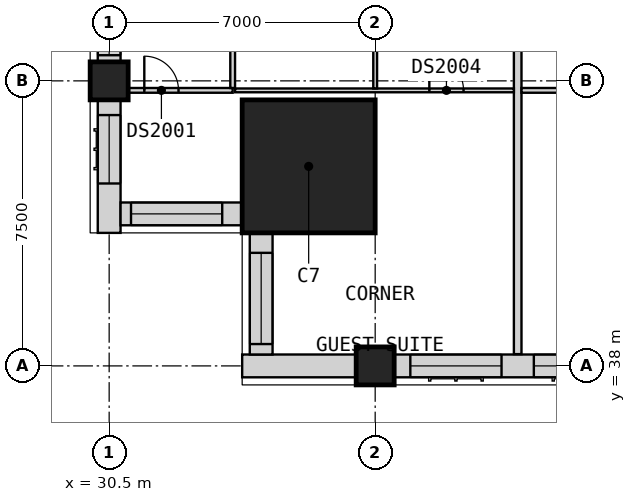
"""IFC4 building model, lengths in metres.
Left out: names, types, materials, properties, quantities, classifications, styles, units other than length and angle.
Written with IfcOpenShell. Run it as: python <this file> out.ifc"""

import sys

from ifc_helpers import new_model, si_unit, direction, frame, frame_2d, origin, origin_2d, place, context, subcontext, project, spatial, rectangle, extrude, element, fill, save


model = new_model("IFC4")
c1 = context("Model", 3, precision=1e-05, world=origin(), true_north=direction((0.0, 1.0)))
c2 = subcontext(c1, "Body", "Model", "MODEL_VIEW")
j1 = project(units=[si_unit("LENGTHUNIT", "METRE"), si_unit("PLANEANGLEUNIT", "RADIAN")], contexts=[c1])
p1 = place(None, origin())
s1 = spatial("IfcSite", under=j1, at=p1, CompositionType="ELEMENT")
p2 = place(p1, origin())
s2 = spatial("IfcBuilding", under=s1, at=p2, CompositionType="ELEMENT")
p3 = place(p2, frame((0.0, 0.0, 133.8)))
s3 = spatial("IfcBuildingStorey", under=s2, at=p3, CompositionType="ELEMENT", Elevation=133.8)
for number, where, z_axis, x_axis in (
    (1, (30.5, 45.5, 0.0), (0.0, 0.0, 1.0), (1.0, 0.0, 0.0)),
    (2, (37.5, 38.0, 0.0), (0.0, 0.0, 1.0), (1.0, 0.0, 0.0)),
):
    element("IfcColumn", number, at=place(p3, frame(where, z_axis=z_axis, x_axis=x_axis)), inside=s3, PredefinedType="COLUMN", context=c2, shape_type="SweptSolid", body=[
        extrude(rectangle(XDim=1.0, YDim=1.0, at=origin_2d()), origin(), (0.0, 0.0, 1.0), 3.6),
    ])
p4 = place(p3, frame((35.75, 43.25, 0.0), z_axis=(0.0, 0.0, 1.0), x_axis=(1.0, 0.0, 0.0)))
e3 = element("IfcColumn", 3, at=p4, inside=s3, PredefinedType="COLUMN", context=c2, shape_type="SweptSolid", body=[
    extrude(rectangle(XDim=3.5, YDim=3.5, at=origin_2d()), origin(), (0.0, 0.0, 1.0), 3.6),
])
p5 = place(p3, frame((34.0, 38.0, 0.0), z_axis=(0.0, 0.0, 1.0), x_axis=(1.0, 0.0, 0.0)))
e4 = element("IfcWall", 4, at=p5, inside=s3, PredefinedType="SOLIDWALL", context=c2, shape_type="SweptSolid", body=[
    extrude(rectangle(XDim=3.0, YDim=0.6, at=frame_2d((1.5, 0.0))), origin(), (0.0, 0.0, 1.0), 3.35),
])
p6 = place(p3, frame((38.0, 38.0, 0.0), z_axis=(0.0, 0.0, 1.0), x_axis=(1.0, 0.0, 0.0)))
e5 = element("IfcWall", 5, at=p6, inside=s3, PredefinedType="SOLIDWALL", context=c2, shape_type="SweptSolid", body=[
    extrude(rectangle(XDim=6.5, YDim=0.6, at=frame_2d((3.25, 0.0))), origin(), (0.0, 0.0, 1.0), 2.85),
])
p7 = place(p6, frame((0.425, 0.0, 0.8)))
e6 = element("IfcOpeningElement", 6, at=p7, cuts=e5, PredefinedType="OPENING", context=c2, shape_type="SweptSolid", body=[
    extrude(rectangle(XDim=2.4, YDim=1.8, at=frame_2d((1.2, 0.9))), frame((0.0, 0.31, 0.0), z_axis=(0.0, -1.0, 0.0), x_axis=(1.0, 0.0, 0.0)), (0.0, 0.0, 1.0), 0.62),
])
p8 = place(p6, frame((3.675, 0.0, 0.8)))
e7 = element("IfcOpeningElement", 7, at=p8, cuts=e5, PredefinedType="OPENING", context=c2, shape_type="SweptSolid", body=[
    extrude(rectangle(XDim=2.4, YDim=1.8, at=frame_2d((1.2, 0.9))), frame((0.0, 0.31, 0.0), z_axis=(0.0, -1.0, 0.0), x_axis=(1.0, 0.0, 0.0)), (0.0, 0.0, 1.0), 0.62),
])
p9 = place(p3, frame((30.5, 52.0, 0.0), z_axis=(0.0, 0.0, 1.0), x_axis=(0.0, -1.0, 0.0)))
e8 = element("IfcWall", 8, at=p9, inside=s3, PredefinedType="SOLIDWALL", context=c2, shape_type="SweptSolid", body=[
    extrude(rectangle(XDim=6.0, YDim=0.6, at=frame_2d((3.0, 0.0))), origin(), (0.0, 0.0, 1.0), 2.85),
])
p10 = place(p9, frame((3.425, 0.0, 0.8)))
e9 = element("IfcOpeningElement", 9, at=p10, cuts=e8, PredefinedType="OPENING", context=c2, shape_type="SweptSolid", body=[
    extrude(rectangle(XDim=2.4, YDim=1.8, at=frame_2d((1.2, 0.9))), frame((0.0, 0.31, 0.0), z_axis=(0.0, -1.0, 0.0), x_axis=(1.0, 0.0, 0.0)), (0.0, 0.0, 1.0), 0.62),
])
p11 = place(p9, frame((0.425, 0.0, 0.8)))
e10 = element("IfcOpeningElement", 10, at=p11, cuts=e8, PredefinedType="OPENING", context=c2, shape_type="SweptSolid", body=[
    extrude(rectangle(XDim=2.4, YDim=1.8, at=frame_2d((1.2, 0.9))), frame((0.0, 0.31, 0.0), z_axis=(0.0, -1.0, 0.0), x_axis=(1.0, 0.0, 0.0)), (0.0, 0.0, 1.0), 0.62),
])
p12 = place(p3, frame((30.5, 45.0, 0.0), z_axis=(0.0, 0.0, 1.0), x_axis=(0.0, -1.0, 0.0)))
e11 = element("IfcWall", 11, at=p12, inside=s3, PredefinedType="SOLIDWALL", context=c2, shape_type="SweptSolid", body=[
    extrude(rectangle(XDim=3.5, YDim=0.6, at=frame_2d((1.75, 0.0))), origin(), (0.0, 0.0, 1.0), 3.35),
])
p13 = place(p12, frame((0.4, 0.0, 0.8)))
e12 = element("IfcOpeningElement", 12, at=p13, cuts=e11, PredefinedType="OPENING", context=c2, shape_type="SweptSolid", body=[
    extrude(rectangle(XDim=1.8, YDim=1.8, at=frame_2d((0.9, 0.9))), frame((0.0, 0.31, 0.0), z_axis=(0.0, -1.0, 0.0), x_axis=(1.0, 0.0, 0.0)), (0.0, 0.0, 1.0), 0.62),
])
p14 = place(p3, frame((30.8, 42.0, 0.0), z_axis=(0.0, 0.0, 1.0), x_axis=(1.0, 0.0, 0.0)))
e13 = element("IfcWall", 13, at=p14, inside=s3, PredefinedType="SOLIDWALL", context=c2, shape_type="SweptSolid", body=[
    extrude(rectangle(XDim=3.2, YDim=0.6, at=frame_2d((1.6, 0.0))), origin(), (0.0, 0.0, 1.0), 3.35),
])
p15 = place(p14, frame((0.275, 0.0, 0.8)))
e14 = element("IfcOpeningElement", 14, at=p15, cuts=e13, PredefinedType="OPENING", context=c2, shape_type="SweptSolid", body=[
    extrude(rectangle(XDim=2.4, YDim=1.8, at=frame_2d((1.2, 0.9))), frame((0.0, 0.31, 0.0), z_axis=(0.0, -1.0, 0.0), x_axis=(1.0, 0.0, 0.0)), (0.0, 0.0, 1.0), 0.62),
])
p16 = place(p3, frame((34.5, 41.5, 0.0), z_axis=(0.0, 0.0, 1.0), x_axis=(0.0, -1.0, 0.0)))
e15 = element("IfcWall", 15, at=p16, inside=s3, PredefinedType="SOLIDWALL", context=c2, shape_type="SweptSolid", body=[
    extrude(rectangle(XDim=3.2, YDim=0.6, at=frame_2d((1.6, 0.0))), origin(), (0.0, 0.0, 1.0), 3.35),
])
p17 = place(p16, frame((0.525, 0.0, 0.8)))
e16 = element("IfcOpeningElement", 16, at=p17, cuts=e15, PredefinedType="OPENING", context=c2, shape_type="SweptSolid", body=[
    extrude(rectangle(XDim=2.4, YDim=1.8, at=frame_2d((1.2, 0.9))), frame((0.0, 0.31, 0.0), z_axis=(0.0, -1.0, 0.0), x_axis=(1.0, 0.0, 0.0)), (0.0, 0.0, 1.0), 0.62),
])
p18 = place(p3, frame((41.25, 38.31, 0.0), z_axis=(0.0, 0.0, 1.0), x_axis=(0.0, 1.0, 0.0)))
e17 = element("IfcWall", 17, at=p18, inside=s3, PredefinedType="PARTITIONING", context=c2, shape_type="SweptSolid", body=[
    extrude(rectangle(XDim=11.715, YDim=0.2, at=frame_2d((5.857, 0.0))), origin(), (0.0, 0.0, 1.0), 3.35),
])
p19 = place(p3, frame((33.812, 45.25, 0.0), z_axis=(0.0, 0.0, 1.0), x_axis=(1.0, 0.0, 0.0)))
e18 = element("IfcWall", 18, at=p19, inside=s3, PredefinedType="PARTITIONING", context=c2, shape_type="SweptSolid", body=[
    extrude(rectangle(XDim=7.337, YDim=0.1, at=frame_2d((3.669, 0.0))), origin(), (0.0, 0.0, 1.0), 3.35),
])
p20 = place(p19, frame((5.113, 0.0, 0.0)))
e19 = element("IfcOpeningElement", 19, at=p20, cuts=e18, PredefinedType="OPENING", context=c2, shape_type="SweptSolid", body=[
    extrude(rectangle(XDim=0.9, YDim=2.1, at=frame_2d((0.45, 1.05))), frame((0.0, 0.06, 0.0), z_axis=(0.0, -1.0, 0.0), x_axis=(1.0, 0.0, 0.0)), (0.0, 0.0, 1.0), 0.12),
])
p21 = place(p3, frame((37.5, 45.3, 0.0), z_axis=(0.0, 0.0, 1.0), x_axis=(0.0, 1.0, 0.0)))
e20 = element("IfcWall", 20, at=p21, inside=s3, PredefinedType="PARTITIONING", context=c2, shape_type="SweptSolid", body=[
    extrude(rectangle(XDim=4.725, YDim=0.1, at=frame_2d((2.362, 0.0))), origin(), (0.0, 0.0, 1.0), 3.35),
])
p22 = place(p21, frame((1.925, 0.0, 0.0)))
e21 = element("IfcOpeningElement", 21, at=p22, cuts=e20, PredefinedType="OPENING", context=c2, shape_type="SweptSolid", body=[
    extrude(rectangle(XDim=0.9, YDim=2.1, at=frame_2d((0.45, 1.05))), frame((0.0, 0.06, 0.0), z_axis=(0.0, -1.0, 0.0), x_axis=(1.0, 0.0, 0.0)), (0.0, 0.0, 1.0), 0.12),
])
p23 = place(p3, frame((30.0, 45.25, 0.0), z_axis=(0.0, 0.0, 1.0), x_axis=(1.0, 0.0, 0.0)))
e22 = element("IfcWall", 22, at=p23, inside=s3, PredefinedType="PARTITIONING", context=c2, shape_type="SweptSolid", body=[
    extrude(rectangle(XDim=3.75, YDim=0.125, at=frame_2d((1.875, 0.0))), origin(), (0.0, 0.0, 1.0), 3.35),
])
p24 = place(p23, frame((1.425, 0.0, 0.0)))
e23 = element("IfcOpeningElement", 23, at=p24, cuts=e22, PredefinedType="OPENING", context=c2, shape_type="SweptSolid", body=[
    extrude(rectangle(XDim=0.9, YDim=2.1, at=frame_2d((0.45, 1.05))), frame((0.0, 0.073, 0.0), z_axis=(0.0, -1.0, 0.0), x_axis=(1.0, 0.0, 0.0)), (0.0, 0.0, 1.0), 0.145),
])
p25 = place(p3, frame((41.35, 45.25, 0.0), z_axis=(0.0, 0.0, 1.0), x_axis=(1.0, 0.0, 0.0)))
e24 = element("IfcWall", 24, at=p25, inside=s3, PredefinedType="PARTITIONING", context=c2, shape_type="SweptSolid", body=[
    extrude(rectangle(XDim=4.4, YDim=0.125, at=frame_2d((2.2, 0.0))), origin(), (0.0, 0.0, 1.0), 3.35),
])
p26 = place(p25, frame((1.7, 0.0, 0.0)))
e25 = element("IfcOpeningElement", 25, at=p26, cuts=e24, PredefinedType="OPENING", context=c2, shape_type="SweptSolid", body=[
    extrude(rectangle(XDim=0.9, YDim=2.1, at=frame_2d((0.45, 1.05))), frame((0.0, 0.073, 0.0), z_axis=(0.0, -1.0, 0.0), x_axis=(1.0, 0.0, 0.0)), (0.0, 0.0, 1.0), 0.145),
])
p27 = place(p3, frame((33.75, 45.312, 0.0), z_axis=(0.0, 0.0, 1.0), x_axis=(0.0, 1.0, 0.0)))
e26 = element("IfcWall", 26, at=p27, inside=s3, PredefinedType="PARTITIONING", context=c2, shape_type="SweptSolid", body=[
    extrude(rectangle(XDim=4.712, YDim=0.125, at=frame_2d((2.356, 0.0))), origin(), (0.0, 0.0, 1.0), 3.35),
])
p28 = place(p7, origin())
e27 = element("IfcWindow", 27, at=p28, inside=s3, PartitioningType="SINGLE_PANEL", PredefinedType="WINDOW", context=c2, shape_type="SweptSolid", body=[
    extrude(rectangle(XDim=2.4, YDim=1.8, at=frame_2d((1.2, 0.9))), frame((0.0, -0.07, 0.0), z_axis=(0.0, -1.0, 0.0), x_axis=(1.0, 0.0, 0.0)), (0.0, 0.0, 1.0), 0.06),
])
fill(e6, e27)
p29 = place(p8, origin())
e28 = element("IfcWindow", 28, at=p29, inside=s3, PartitioningType="SINGLE_PANEL", PredefinedType="WINDOW", context=c2, shape_type="SweptSolid", body=[
    extrude(rectangle(XDim=2.4, YDim=1.8, at=frame_2d((1.2, 0.9))), frame((0.0, -0.07, 0.0), z_axis=(0.0, -1.0, 0.0), x_axis=(1.0, 0.0, 0.0)), (0.0, 0.0, 1.0), 0.06),
])
fill(e7, e28)
p30 = place(p10, origin())
e29 = element("IfcWindow", 29, at=p30, inside=s3, PartitioningType="SINGLE_PANEL", PredefinedType="WINDOW", context=c2, shape_type="SweptSolid", body=[
    extrude(rectangle(XDim=2.4, YDim=1.8, at=frame_2d((1.2, 0.9))), frame((0.0, -0.07, 0.0), z_axis=(0.0, -1.0, 0.0), x_axis=(1.0, 0.0, 0.0)), (0.0, 0.0, 1.0), 0.06),
])
fill(e9, e29)
p31 = place(p13, origin())
e30 = element("IfcWindow", 30, at=p31, inside=s3, PartitioningType="SINGLE_PANEL", PredefinedType="WINDOW", context=c2, shape_type="SweptSolid", body=[
    extrude(rectangle(XDim=1.8, YDim=1.8, at=frame_2d((0.9, 0.9))), frame((0.0, -0.07, 0.0), z_axis=(0.0, -1.0, 0.0), x_axis=(1.0, 0.0, 0.0)), (0.0, 0.0, 1.0), 0.06),
])
fill(e12, e30)
p32 = place(p15, origin())
e31 = element("IfcWindow", 31, at=p32, inside=s3, PartitioningType="SINGLE_PANEL", PredefinedType="WINDOW", context=c2, shape_type="SweptSolid", body=[
    extrude(rectangle(XDim=2.4, YDim=1.8, at=frame_2d((1.2, 0.9))), frame((0.0, -0.07, 0.0), z_axis=(0.0, -1.0, 0.0), x_axis=(1.0, 0.0, 0.0)), (0.0, 0.0, 1.0), 0.06),
])
fill(e14, e31)
p33 = place(p17, origin())
e32 = element("IfcWindow", 32, at=p33, inside=s3, PartitioningType="SINGLE_PANEL", PredefinedType="WINDOW", context=c2, shape_type="SweptSolid", body=[
    extrude(rectangle(XDim=2.4, YDim=1.8, at=frame_2d((1.2, 0.9))), frame((0.0, -0.07, 0.0), z_axis=(0.0, -1.0, 0.0), x_axis=(1.0, 0.0, 0.0)), (0.0, 0.0, 1.0), 0.06),
])
fill(e16, e32)
p34 = place(p24, origin())
e33 = element("IfcDoor", 33, at=p34, inside=s3, OperationType="SINGLE_SWING_LEFT", PredefinedType="DOOR", context=c2, shape_type="SweptSolid", body=[
    extrude(rectangle(XDim=0.9, YDim=2.1, at=frame_2d((0.45, 1.05))), frame((0.0, 0.025, 0.0), z_axis=(0.0, -1.0, 0.0), x_axis=(1.0, 0.0, 0.0)), (0.0, 0.0, 1.0), 0.05),
])
fill(e23, e33)
p35 = place(p20, origin())
e34 = element("IfcDoor", 34, at=p35, inside=s3, OperationType="SINGLE_SWING_LEFT", PredefinedType="DOOR", context=c2, shape_type="SweptSolid", body=[
    extrude(rectangle(XDim=0.9, YDim=2.1, at=frame_2d((0.45, 1.05))), frame((0.0, 0.025, 0.0), z_axis=(0.0, -1.0, 0.0), x_axis=(1.0, 0.0, 0.0)), (0.0, 0.0, 1.0), 0.05),
])
fill(e19, e34)
save(model, sys.argv[1])
